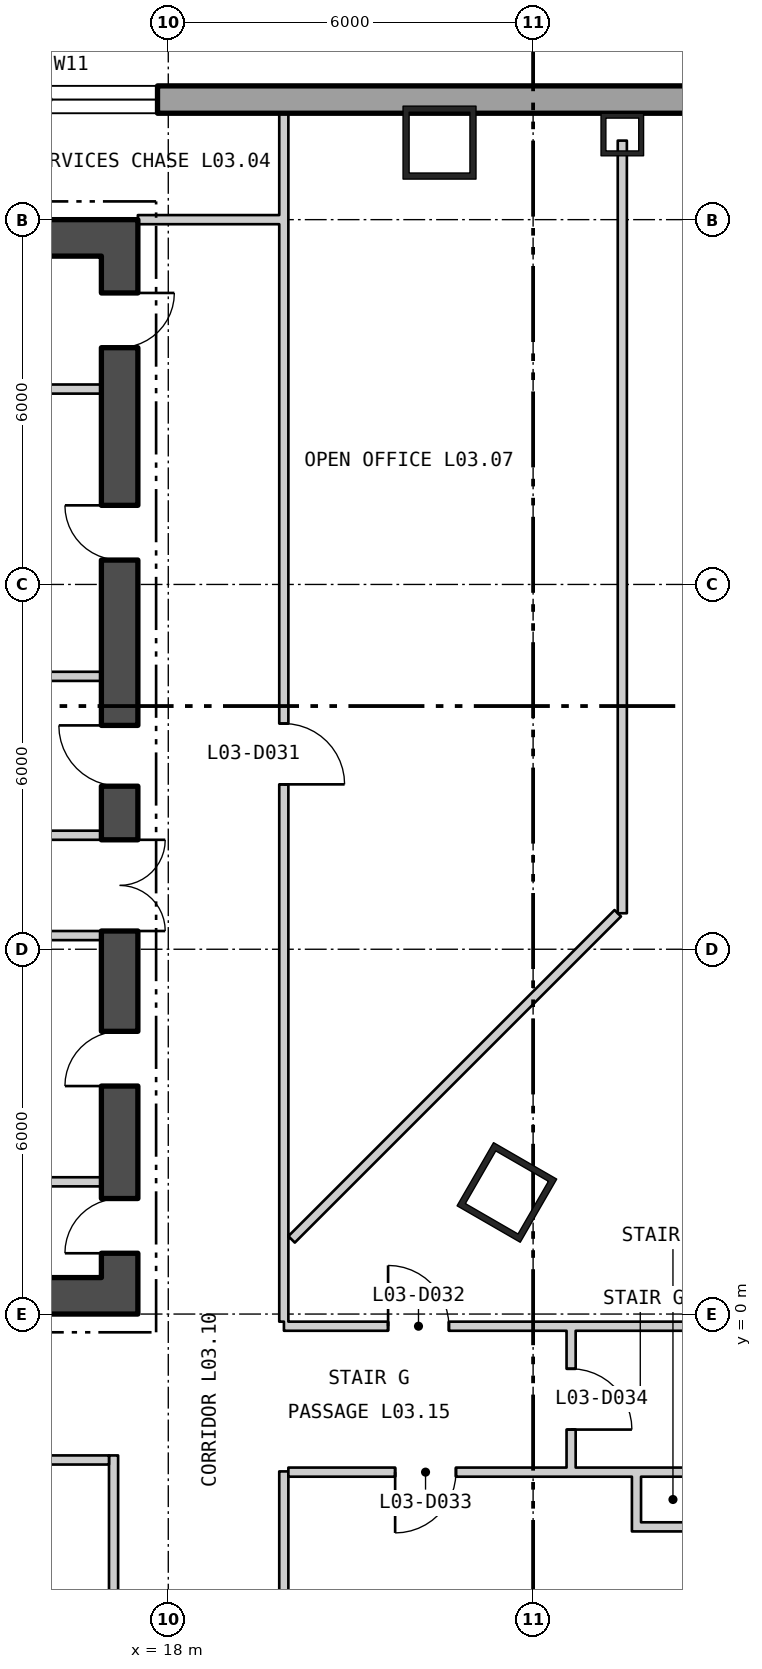
"""IFC4 building model, lengths in metres.
Left out: names, types, materials, properties, quantities, classifications, styles, units other than length and angle.
Written with IfcOpenShell. Run it as: python <this file> out.ifc"""

import sys

from ifc_helpers import new_model, si_unit, direction, frame, frame_2d, origin, origin_2d, place, context, subcontext, project, spatial, polyline, rectangle, hollow_rectangle, outline, extrude, element, fill, save


model = new_model("IFC4")
c1 = context("Model", 3, precision=1e-05, world=origin(), true_north=direction((0.0, 1.0)))
c2 = subcontext(c1, "Body", "Model", "MODEL_VIEW")
j1 = project(units=[si_unit("LENGTHUNIT", "METRE"), si_unit("PLANEANGLEUNIT", "RADIAN")], contexts=[c1])
p1 = place(None, origin())
s1 = spatial("IfcSite", under=j1, at=p1, CompositionType="ELEMENT")
p2 = place(p1, origin())
s2 = spatial("IfcBuilding", under=s1, at=p2, CompositionType="ELEMENT")
p3 = place(p2, frame((0.0, 0.0, 18.6)))
s3 = spatial("IfcBuildingStorey", under=s2, at=p3, CompositionType="ELEMENT", Elevation=18.6)
for number, where, z_axis, x_axis in (
    (1, (22.461, 19.267, 0.0), (0.0, 0.0, 1.0), (-1.0, 0.0, 0.0)),
    (2, (23.569, 2.0, 0.0), (0.0, 0.0, 1.0), (0.5, 0.866, 0.0)),
):
    element("IfcColumn", number, at=place(p3, frame(where, z_axis=z_axis, x_axis=x_axis)), inside=s3, PredefinedType="COLUMN", context=c2, shape_type="SweptSolid", body=[
        extrude(hollow_rectangle(XDim=1.2, YDim=1.2, WallThickness=0.1, at=origin_2d()), origin(), (0.0, 0.0, 1.0), 5.1),
    ])
p4 = place(p3, frame((25.467, 19.4, 0.0), z_axis=(0.0, 0.0, 1.0), x_axis=(-1.0, 0.0, 0.0)))
e3 = element("IfcColumn", 3, at=p4, inside=s3, PredefinedType="COLUMN", context=c2, shape_type="SweptSolid", body=[
    extrude(hollow_rectangle(XDim=0.7, YDim=0.7, WallThickness=0.08, at=origin_2d()), origin(), (0.0, 0.0, 1.0), 5.1),
])
p5 = place(p3, frame((38.775, 19.975, -0.4), z_axis=(0.0, 0.0, 1.0), x_axis=(-1.0, 0.0, 0.0)))
e4 = element("IfcWall", 4, at=p5, inside=s3, PredefinedType="SOLIDWALL", context=c2, shape_type="SweptSolid", body=[
    extrude(outline(polyline([(-0.225, -0.225), (77.775, -0.225), (77.325, 0.225), (0.225, 0.225), (-0.225, -0.225)])), origin(), (0.0, 0.0, 1.0), 5.1),
])
p6 = place(p5, frame((1.958, 0.0, 1.3)))
e5 = element("IfcOpeningElement", 5, at=p6, cuts=e4, PredefinedType="OPENING", context=c2, shape_type="SweptSolid", body=[
    extrude(rectangle(XDim=3.6, YDim=3.2, at=frame_2d((1.8, 1.6))), frame((0.0, 0.235, 0.0), z_axis=(0.0, -1.0, 0.0), x_axis=(1.0, 0.0, 0.0)), (0.0, 0.0, 1.0), 0.47),
])
p7 = place(p5, frame((8.325, 0.0, 1.3)))
e6 = element("IfcOpeningElement", 6, at=p7, cuts=e4, PredefinedType="OPENING", context=c2, shape_type="SweptSolid", body=[
    extrude(rectangle(XDim=3.6, YDim=3.2, at=frame_2d((1.8, 1.6))), frame((0.0, 0.235, 0.0), z_axis=(0.0, -1.0, 0.0), x_axis=(1.0, 0.0, 0.0)), (0.0, 0.0, 1.0), 0.47),
])
p8 = place(p5, frame((20.952, 0.0, 1.3)))
e7 = element("IfcOpeningElement", 7, at=p8, cuts=e4, PredefinedType="OPENING", context=c2, shape_type="SweptSolid", body=[
    extrude(rectangle(XDim=3.6, YDim=3.2, at=frame_2d((1.8, 1.6))), frame((0.0, 0.235, 0.0), z_axis=(0.0, -1.0, 0.0), x_axis=(1.0, 0.0, 0.0)), (0.0, 0.0, 1.0), 0.47),
])
p9 = place(p5, frame((27.425, 0.0, 1.3)))
e8 = element("IfcOpeningElement", 8, at=p9, cuts=e4, PredefinedType="OPENING", context=c2, shape_type="SweptSolid", body=[
    extrude(rectangle(XDim=3.6, YDim=3.2, at=frame_2d((1.8, 1.6))), frame((0.0, 0.235, 0.0), z_axis=(0.0, -1.0, 0.0), x_axis=(1.0, 0.0, 0.0)), (0.0, 0.0, 1.0), 0.47),
])
p10 = place(p5, frame((46.525, 0.0, 1.3)))
e9 = element("IfcOpeningElement", 9, at=p10, cuts=e4, PredefinedType="OPENING", context=c2, shape_type="SweptSolid", body=[
    extrude(rectangle(XDim=3.6, YDim=3.2, at=frame_2d((1.8, 1.6))), frame((0.0, 0.235, 0.0), z_axis=(0.0, -1.0, 0.0), x_axis=(1.0, 0.0, 0.0)), (0.0, 0.0, 1.0), 0.47),
])
p11 = place(p5, frame((52.998, 0.0, 1.3)))
e10 = element("IfcOpeningElement", 10, at=p11, cuts=e4, PredefinedType="OPENING", context=c2, shape_type="SweptSolid", body=[
    extrude(rectangle(XDim=3.6, YDim=3.2, at=frame_2d((1.8, 1.6))), frame((0.0, 0.235, 0.0), z_axis=(0.0, -1.0, 0.0), x_axis=(1.0, 0.0, 0.0)), (0.0, 0.0, 1.0), 0.47),
])
p12 = place(p5, frame((65.625, 0.0, 1.3)))
e11 = element("IfcOpeningElement", 11, at=p12, cuts=e4, PredefinedType="OPENING", context=c2, shape_type="SweptSolid", body=[
    extrude(rectangle(XDim=3.6, YDim=3.2, at=frame_2d((1.8, 1.6))), frame((0.0, 0.235, 0.0), z_axis=(0.0, -1.0, 0.0), x_axis=(1.0, 0.0, 0.0)), (0.0, 0.0, 1.0), 0.47),
])
p13 = place(p5, frame((71.992, 0.0, 1.3)))
e12 = element("IfcOpeningElement", 12, at=p13, cuts=e4, PredefinedType="OPENING", context=c2, shape_type="SweptSolid", body=[
    extrude(rectangle(XDim=3.6, YDim=3.2, at=frame_2d((1.8, 1.6))), frame((0.0, 0.235, 0.0), z_axis=(0.0, -1.0, 0.0), x_axis=(1.0, 0.0, 0.0)), (0.0, 0.0, 1.0), 0.47),
])
p14 = place(p3, frame((-17.5, 0.3, 0.0), z_axis=(0.0, 0.0, 1.0), x_axis=(1.0, 0.0, 0.0)))
e13 = element("IfcWall", 13, at=p14, inside=s3, PredefinedType="SHEAR", context=c2, shape_type="SweptSolid", body=[
    extrude(rectangle(XDim=35.0, YDim=0.6, at=frame_2d((17.5, 0.0))), origin(), (0.0, 0.0, 1.0), 4.88),
])
p15 = place(p14, frame((12.0, 0.0, 0.0)))
e14 = element("IfcOpeningElement", 14, at=p15, cuts=e13, PredefinedType="OPENING", context=c2, shape_type="SweptSolid", body=[
    extrude(rectangle(XDim=1.8, YDim=2.4, at=frame_2d((0.9, 1.2))), frame((0.0, 0.31, 0.0), z_axis=(0.0, -1.0, 0.0), x_axis=(1.0, 0.0, 0.0)), (0.0, 0.0, 1.0), 0.62),
])
p16 = place(p14, frame((22.0, 0.0, 0.0)))
e15 = element("IfcOpeningElement", 15, at=p16, cuts=e13, PredefinedType="OPENING", context=c2, shape_type="SweptSolid", body=[
    extrude(rectangle(XDim=1.8, YDim=2.4, at=frame_2d((0.9, 1.2))), frame((0.0, 0.31, 0.0), z_axis=(0.0, -1.0, 0.0), x_axis=(1.0, 0.0, 0.0)), (0.0, 0.0, 1.0), 0.62),
])
p17 = place(p3, frame((-17.5, 17.7, 0.0), z_axis=(0.0, 0.0, 1.0), x_axis=(1.0, 0.0, 0.0)))
e16 = element("IfcWall", 16, at=p17, inside=s3, PredefinedType="SHEAR", context=c2, shape_type="SweptSolid", body=[
    extrude(rectangle(XDim=35.0, YDim=0.6, at=frame_2d((17.5, 0.0))), origin(), (0.0, 0.0, 1.0), 4.88),
])
p18 = place(p3, frame((17.2, 0.6, 0.0), z_axis=(0.0, 0.0, 1.0), x_axis=(0.0, 1.0, 0.0)))
e17 = element("IfcWall", 17, at=p18, inside=s3, PredefinedType="SHEAR", context=c2, shape_type="SweptSolid", body=[
    extrude(rectangle(XDim=16.8, YDim=0.6, at=frame_2d((8.4, 0.0))), origin(), (0.0, 0.0, 1.0), 4.88),
])
p19 = place(p18, frame((5.7, 0.0, 0.0)))
e18 = element("IfcOpeningElement", 18, at=p19, cuts=e17, PredefinedType="OPENING", context=c2, shape_type="SweptSolid", body=[
    extrude(rectangle(XDim=1.5, YDim=2.1, at=frame_2d((0.75, 1.05))), frame((0.0, 0.31, 0.0), z_axis=(0.0, -1.0, 0.0), x_axis=(1.0, 0.0, 0.0)), (0.0, 0.0, 1.0), 0.62),
])
p20 = place(p18, frame((0.4, 0.0, 0.0)))
e19 = element("IfcOpeningElement", 19, at=p20, cuts=e17, PredefinedType="OPENING", context=c2, shape_type="SweptSolid", body=[
    extrude(rectangle(XDim=0.9, YDim=2.1, at=frame_2d((0.45, 1.05))), frame((0.0, 0.31, 0.0), z_axis=(0.0, -1.0, 0.0), x_axis=(1.0, 0.0, 0.0)), (0.0, 0.0, 1.0), 0.62),
])
p21 = place(p18, frame((3.15, 0.0, 0.0)))
e20 = element("IfcOpeningElement", 20, at=p21, cuts=e17, PredefinedType="OPENING", context=c2, shape_type="SweptSolid", body=[
    extrude(rectangle(XDim=0.9, YDim=2.1, at=frame_2d((0.45, 1.05))), frame((0.0, 0.31, 0.0), z_axis=(0.0, -1.0, 0.0), x_axis=(1.0, 0.0, 0.0)), (0.0, 0.0, 1.0), 0.62),
])
p22 = place(p18, frame((8.082, 0.0, 0.0)))
e21 = element("IfcOpeningElement", 21, at=p22, cuts=e17, PredefinedType="OPENING", context=c2, shape_type="SweptSolid", body=[
    extrude(rectangle(XDim=1.0, YDim=2.1, at=frame_2d((0.5, 1.05))), frame((0.0, 0.31, 0.0), z_axis=(0.0, -1.0, 0.0), x_axis=(1.0, 0.0, 0.0)), (0.0, 0.0, 1.0), 0.62),
])
p23 = place(p18, frame((11.801, 0.0, 0.0)))
e22 = element("IfcOpeningElement", 22, at=p23, cuts=e17, PredefinedType="OPENING", context=c2, shape_type="SweptSolid", body=[
    extrude(rectangle(XDim=0.9, YDim=2.1, at=frame_2d((0.45, 1.05))), frame((0.0, 0.31, 0.0), z_axis=(0.0, -1.0, 0.0), x_axis=(1.0, 0.0, 0.0)), (0.0, 0.0, 1.0), 0.62),
])
p24 = place(p18, frame((15.294, 0.0, 0.0)))
e23 = element("IfcOpeningElement", 23, at=p24, cuts=e17, PredefinedType="OPENING", context=c2, shape_type="SweptSolid", body=[
    extrude(rectangle(XDim=0.9, YDim=2.1, at=frame_2d((0.45, 1.05))), frame((0.0, 0.31, 0.0), z_axis=(0.0, -1.0, 0.0), x_axis=(1.0, 0.0, 0.0)), (0.0, 0.0, 1.0), 0.62),
])
for number, where, z_axis, x_axis in (
    (24, (14.5, 6.225, 0.0), (0.0, 0.0, 1.0), (1.0, 0.0, 0.0)),
    (25, (14.5, 7.875, 0.0), (0.0, 0.0, 1.0), (1.0, 0.0, 0.0)),
    (26, (14.5, 2.175, 0.0), (0.0, 0.0, 1.0), (1.0, 0.0, 0.0)),
    (27, (14.5, 10.489, 0.0), (0.0, 0.0, 1.0), (1.0, 0.0, 0.0)),
    (28, (14.5, 15.213, 0.0), (0.0, 0.0, 1.0), (1.0, 0.0, 0.0)),
):
    element("IfcWall", number, at=place(p3, frame(where, z_axis=z_axis, x_axis=x_axis)), inside=s3, PredefinedType="PARTITIONING", context=c2, shape_type="SweptSolid", body=[
        extrude(rectangle(XDim=2.4, YDim=0.15, at=frame_2d((1.2, 0.0))), origin(), (0.0, 0.0, 1.0), 4.88),
    ])
p25 = place(p3, frame((9.075, -2.4, 0.0), z_axis=(0.0, 0.0, 1.0), x_axis=(1.0, 0.0, 0.0)))
e29 = element("IfcWall", 29, at=p25, inside=s3, PredefinedType="PARTITIONING", context=c2, shape_type="SweptSolid", body=[
    extrude(rectangle(XDim=7.95, YDim=0.15, at=frame_2d((3.975, 0.0))), origin(), (0.0, 0.0, 1.0), 4.88),
])
p26 = place(p25, frame((1.304, 0.0, 0.0)))
e30 = element("IfcOpeningElement", 30, at=p26, cuts=e29, PredefinedType="OPENING", context=c2, shape_type="SweptSolid", body=[
    extrude(rectangle(XDim=1.0, YDim=2.1, at=frame_2d((0.5, 1.05))), frame((0.0, 0.085, 0.0), z_axis=(0.0, -1.0, 0.0), x_axis=(1.0, 0.0, 0.0)), (0.0, 0.0, 1.0), 0.17),
])
p27 = place(p25, frame((5.304, 0.0, 0.0)))
e31 = element("IfcOpeningElement", 31, at=p27, cuts=e29, PredefinedType="OPENING", context=c2, shape_type="SweptSolid", body=[
    extrude(rectangle(XDim=1.0, YDim=2.1, at=frame_2d((0.5, 1.05))), frame((0.0, 0.085, 0.0), z_axis=(0.0, -1.0, 0.0), x_axis=(1.0, 0.0, 0.0)), (0.0, 0.0, 1.0), 0.17),
])
p28 = place(p3, frame((17.1, -21.375, 0.0), z_axis=(0.0, 0.0, 1.0), x_axis=(0.0, 1.0, 0.0)))
e32 = element("IfcWall", 32, at=p28, inside=s3, PredefinedType="PARTITIONING", context=c2, shape_type="SweptSolid", body=[
    extrude(rectangle(XDim=19.05, YDim=0.15, at=frame_2d((9.525, 0.0))), origin(), (0.0, 0.0, 1.0), 4.88),
])
p29 = place(p3, frame((17.5, 18.0, 0.0), z_axis=(0.0, 0.0, 1.0), x_axis=(1.0, 0.0, 0.0)))
e33 = element("IfcWall", 33, at=p29, inside=s3, PredefinedType="PARTITIONING", context=c2, shape_type="SweptSolid", body=[
    extrude(rectangle(XDim=2.475, YDim=0.15, at=frame_2d((1.238, 0.0))), origin(), (0.0, 0.0, 1.0), 4.33),
])
p30 = place(p3, frame((19.9, -23.775, 0.0), z_axis=(0.0, 0.0, 1.0), x_axis=(0.0, 1.0, 0.0)))
e34 = element("IfcWall", 34, at=p30, inside=s3, PredefinedType="PARTITIONING", context=c2, shape_type="SweptSolid", body=[
    extrude(rectangle(XDim=21.187, YDim=0.15, at=frame_2d((10.594, 0.0))), origin(), (0.0, 0.0, 1.0), 4.88),
])
p31 = place(p30, frame((3.017, 0.0, 0.0)))
e35 = element("IfcOpeningElement", 35, at=p31, cuts=e34, PredefinedType="OPENING", context=c2, shape_type="SweptSolid", body=[
    extrude(rectangle(XDim=1.0, YDim=2.1, at=frame_2d((0.5, 1.05))), frame((0.0, 0.085, 0.0), z_axis=(0.0, -1.0, 0.0), x_axis=(1.0, 0.0, 0.0)), (0.0, 0.0, 1.0), 0.17),
])
p32 = place(p30, frame((12.423, 0.0, 0.0)))
e36 = element("IfcOpeningElement", 36, at=p32, cuts=e34, PredefinedType="OPENING", context=c2, shape_type="SweptSolid", body=[
    extrude(rectangle(XDim=1.0, YDim=2.1, at=frame_2d((0.5, 1.05))), frame((0.0, 0.085, 0.0), z_axis=(0.0, -1.0, 0.0), x_axis=(1.0, 0.0, 0.0)), (0.0, 0.0, 1.0), 0.17),
])
p33 = place(p3, frame((19.9, -0.125, 0.0), z_axis=(0.0, 0.0, 1.0), x_axis=(0.0, 1.0, 0.0)))
e37 = element("IfcWall", 37, at=p33, inside=s3, PredefinedType="PARTITIONING", context=c2, shape_type="SweptSolid", body=[
    extrude(rectangle(XDim=1.15, YDim=0.15, at=frame_2d((0.575, 0.0))), origin(), (0.0, 0.0, 1.0), 4.88),
])
p34 = place(p3, frame((19.9, 1.025, 0.0), z_axis=(0.0, 0.0, 1.0), x_axis=(0.0, 1.0, 0.0)))
e38 = element("IfcWall", 38, at=p34, inside=s3, PredefinedType="PARTITIONING", context=c2, shape_type="SweptSolid", body=[
    extrude(rectangle(XDim=16.9, YDim=0.15, at=frame_2d((8.45, 0.0))), origin(), (0.0, 0.0, 1.0), 4.88),
])
p35 = place(p34, frame((7.687, 0.0, 0.0)))
e39 = element("IfcOpeningElement", 39, at=p35, cuts=e38, PredefinedType="OPENING", context=c2, shape_type="SweptSolid", body=[
    extrude(rectangle(XDim=1.0, YDim=2.1, at=frame_2d((0.5, 1.05))), frame((0.0, 0.085, 0.0), z_axis=(0.0, -1.0, 0.0), x_axis=(1.0, 0.0, 0.0)), (0.0, 0.0, 1.0), 0.17),
])
p36 = place(p3, frame((19.9, 18.075, 0.0), z_axis=(0.0, 0.0, 1.0), x_axis=(0.0, 1.0, 0.0)))
e40 = element("IfcWall", 40, at=p36, inside=s3, PredefinedType="PARTITIONING", context=c2, shape_type="SweptSolid", body=[
    extrude(rectangle(XDim=1.675, YDim=0.15, at=frame_2d((0.838, 0.0))), origin(), (0.0, 0.0, 1.0), 4.88),
])
p37 = place(p3, frame((19.902, -0.2, 0.0), z_axis=(0.0, 0.0, 1.0), x_axis=(1.0, 0.0, 0.0)))
e41 = element("IfcWall", 41, at=p37, inside=s3, PredefinedType="PARTITIONING", context=c2, shape_type="SweptSolid", body=[
    extrude(rectangle(XDim=6.848, YDim=0.15, at=frame_2d((3.424, 0.0))), origin(), (0.0, 0.0, 1.0), 4.88),
])
p38 = place(p37, frame((1.713, 0.0, 0.0)))
e42 = element("IfcOpeningElement", 42, at=p38, cuts=e41, PredefinedType="OPENING", context=c2, shape_type="SweptSolid", body=[
    extrude(rectangle(XDim=1.0, YDim=2.1, at=frame_2d((0.5, 1.05))), frame((0.0, 0.085, 0.0), z_axis=(0.0, -1.0, 0.0), x_axis=(1.0, 0.0, 0.0)), (0.0, 0.0, 1.0), 0.17),
])
p39 = place(p3, frame((19.975, -2.6, 0.0), z_axis=(0.0, 0.0, 1.0), x_axis=(1.0, 0.0, 0.0)))
e43 = element("IfcWall", 43, at=p39, inside=s3, PredefinedType="PARTITIONING", context=c2, shape_type="SweptSolid", body=[
    extrude(rectangle(XDim=5.713, YDim=0.15, at=frame_2d((2.857, 0.0))), origin(), (0.0, 0.0, 1.0), 4.88),
])
p40 = place(p39, frame((1.756, 0.0, 0.0)))
e44 = element("IfcOpeningElement", 44, at=p40, cuts=e43, PredefinedType="OPENING", context=c2, shape_type="SweptSolid", body=[
    extrude(rectangle(XDim=1.0, YDim=2.1, at=frame_2d((0.5, 1.05))), frame((0.0, 0.085, 0.0), z_axis=(0.0, -1.0, 0.0), x_axis=(1.0, 0.0, 0.0)), (0.0, 0.0, 1.0), 0.17),
])
p41 = place(p3, frame((20.028, 1.228, 0.0), z_axis=(0.0, 0.0, 1.0), x_axis=(0.707106781187, 0.707106781187, 0.0)))
e45 = element("IfcWall", 45, at=p41, inside=s3, PredefinedType="PARTITIONING", context=c2, shape_type="SweptSolid", body=[
    extrude(rectangle(XDim=7.586, YDim=0.15, at=frame_2d((3.793, 0.0))), origin(), (0.0, 0.0, 1.0), 4.88),
])
p42 = place(p3, frame((24.625, -2.525, 0.0), z_axis=(0.0, 0.0, 1.0), x_axis=(0.0, 1.0, 0.0)))
e46 = element("IfcWall", 46, at=p42, inside=s3, PredefinedType="PARTITIONING", context=c2, shape_type="SweptSolid", body=[
    extrude(rectangle(XDim=2.25, YDim=0.15, at=frame_2d((1.125, 0.0))), origin(), (0.0, 0.0, 1.0), 4.88),
])
p43 = place(p42, frame((0.625, 0.0, 0.0)))
e47 = element("IfcOpeningElement", 47, at=p43, cuts=e46, PredefinedType="OPENING", context=c2, shape_type="SweptSolid", body=[
    extrude(rectangle(XDim=1.0, YDim=2.1, at=frame_2d((0.5, 1.05))), frame((0.0, 0.085, 0.0), z_axis=(0.0, -1.0, 0.0), x_axis=(1.0, 0.0, 0.0)), (0.0, 0.0, 1.0), 0.17),
])
p44 = place(p3, frame((25.467, 6.592, 0.0), z_axis=(0.0, 0.0, 1.0), x_axis=(0.0, 1.0, 0.0)))
e48 = element("IfcWall", 48, at=p44, inside=s3, PredefinedType="PARTITIONING", context=c2, shape_type="SweptSolid", body=[
    extrude(rectangle(XDim=7.736, YDim=0.15, at=frame_2d((3.868, 0.0))), origin(), (0.0, 0.0, 1.0), 4.88),
])
p45 = place(p3, frame((25.467, 14.328, 0.0), z_axis=(0.0, 0.0, 1.0), x_axis=(0.0, 1.0, 0.0)))
e49 = element("IfcWall", 49, at=p45, inside=s3, PredefinedType="PARTITIONING", context=c2, shape_type="SweptSolid", body=[
    extrude(rectangle(XDim=4.972, YDim=0.15, at=frame_2d((2.486, 0.0))), origin(), (0.0, 0.0, 1.0), 4.28),
])
p46 = place(p3, frame((25.625, -3.5, 0.0), z_axis=(0.0, 0.0, 1.0), x_axis=(1.0, 0.0, 0.0)))
e50 = element("IfcWall", 50, at=p46, inside=s3, PredefinedType="PARTITIONING", context=c2, shape_type="SweptSolid", body=[
    extrude(rectangle(XDim=1.125, YDim=0.15, at=frame_2d((0.562, 0.0))), origin(), (0.0, 0.0, 1.0), 4.88),
])
p47 = place(p3, frame((25.688, -2.6, 0.0), z_axis=(0.0, 0.0, 1.0), x_axis=(1.0, 0.0, 0.0)))
e51 = element("IfcWall", 51, at=p47, inside=s3, PredefinedType="PARTITIONING", context=c2, shape_type="SweptSolid", body=[
    extrude(rectangle(XDim=1.062, YDim=0.15, at=frame_2d((0.531, 0.0))), origin(), (0.0, 0.0, 1.0), 4.88),
])
p48 = place(p3, frame((25.7, -3.425, 0.0), z_axis=(0.0, 0.0, 1.0), x_axis=(0.0, 1.0, 0.0)))
e52 = element("IfcWall", 52, at=p48, inside=s3, PredefinedType="PARTITIONING", context=c2, shape_type="SweptSolid", body=[
    extrude(rectangle(XDim=0.75, YDim=0.15, at=frame_2d((0.375, 0.0))), origin(), (0.0, 0.0, 1.0), 4.88),
])
p49 = place(p8, origin())
e53 = element("IfcWindow", 53, at=p49, inside=s3, PartitioningType="SINGLE_PANEL", PredefinedType="WINDOW", context=c2, shape_type="SweptSolid", body=[
    extrude(rectangle(XDim=3.6, YDim=3.2, at=frame_2d((1.8, 1.6))), frame((0.0, 0.105, 0.0), z_axis=(0.0, -1.0, 0.0), x_axis=(1.0, 0.0, 0.0)), (0.0, 0.0, 1.0), 0.06),
])
fill(e7, e53)
p50 = place(p19, origin())
e54 = element("IfcDoor", 54, at=p50, inside=s3, OperationType="DOUBLE_DOOR_SINGLE_SWING", PredefinedType="DOOR", context=c2, shape_type="SweptSolid", body=[
    extrude(rectangle(XDim=1.5, YDim=2.1, at=frame_2d((0.75, 1.05))), frame((0.0, 0.025, 0.0), z_axis=(0.0, -1.0, 0.0), x_axis=(1.0, 0.0, 0.0)), (0.0, 0.0, 1.0), 0.05),
])
fill(e18, e54)
p51 = place(p20, origin())
e55 = element("IfcDoor", 55, at=p51, inside=s3, OperationType="SINGLE_SWING_RIGHT", PredefinedType="DOOR", context=c2, shape_type="SweptSolid", body=[
    extrude(rectangle(XDim=0.9, YDim=2.1, at=frame_2d((0.45, 1.05))), frame((0.0, 0.025, 0.0), z_axis=(0.0, -1.0, 0.0), x_axis=(1.0, 0.0, 0.0)), (0.0, 0.0, 1.0), 0.05),
])
fill(e19, e55)
p52 = place(p21, origin())
e56 = element("IfcDoor", 56, at=p52, inside=s3, OperationType="SINGLE_SWING_RIGHT", PredefinedType="DOOR", context=c2, shape_type="SweptSolid", body=[
    extrude(rectangle(XDim=0.9, YDim=2.1, at=frame_2d((0.45, 1.05))), frame((0.0, 0.025, 0.0), z_axis=(0.0, -1.0, 0.0), x_axis=(1.0, 0.0, 0.0)), (0.0, 0.0, 1.0), 0.05),
])
fill(e20, e56)
p53 = place(p22, origin())
e57 = element("IfcDoor", 57, at=p53, inside=s3, OperationType="SINGLE_SWING_LEFT", PredefinedType="DOOR", context=c2, shape_type="SweptSolid", body=[
    extrude(rectangle(XDim=1.0, YDim=2.1, at=frame_2d((0.5, 1.05))), frame((0.0, 0.025, 0.0), z_axis=(0.0, -1.0, 0.0), x_axis=(1.0, 0.0, 0.0)), (0.0, 0.0, 1.0), 0.05),
])
fill(e21, e57)
p54 = place(p23, origin())
e58 = element("IfcDoor", 58, at=p54, inside=s3, OperationType="SINGLE_SWING_LEFT", PredefinedType="DOOR", context=c2, shape_type="SweptSolid", body=[
    extrude(rectangle(XDim=0.9, YDim=2.1, at=frame_2d((0.45, 1.05))), frame((0.0, 0.025, 0.0), z_axis=(0.0, -1.0, 0.0), x_axis=(1.0, 0.0, 0.0)), (0.0, 0.0, 1.0), 0.05),
])
fill(e22, e58)
p55 = place(p24, origin())
e59 = element("IfcDoor", 59, at=p55, inside=s3, OperationType="SINGLE_SWING_RIGHT", PredefinedType="DOOR", context=c2, shape_type="SweptSolid", body=[
    extrude(rectangle(XDim=0.9, YDim=2.1, at=frame_2d((0.45, 1.05))), frame((0.0, 0.025, 0.0), z_axis=(0.0, -1.0, 0.0), x_axis=(1.0, 0.0, 0.0)), (0.0, 0.0, 1.0), 0.05),
])
fill(e23, e59)
p56 = place(p35, origin())
e60 = element("IfcDoor", 60, at=p56, inside=s3, OperationType="SINGLE_SWING_LEFT", PredefinedType="DOOR", context=c2, shape_type="SweptSolid", body=[
    extrude(rectangle(XDim=1.0, YDim=2.1, at=frame_2d((0.5, 1.05))), frame((0.0, 0.025, 0.0), z_axis=(0.0, -1.0, 0.0), x_axis=(1.0, 0.0, 0.0)), (0.0, 0.0, 1.0), 0.05),
])
fill(e39, e60)
p57 = place(p38, origin())
e61 = element("IfcDoor", 61, at=p57, inside=s3, OperationType="SINGLE_SWING_RIGHT", PredefinedType="DOOR", context=c2, shape_type="SweptSolid", body=[
    extrude(rectangle(XDim=1.0, YDim=2.1, at=frame_2d((0.5, 1.05))), frame((0.0, 0.025, 0.0), z_axis=(0.0, -1.0, 0.0), x_axis=(1.0, 0.0, 0.0)), (0.0, 0.0, 1.0), 0.05),
])
fill(e42, e61)
p58 = place(p40, origin())
e62 = element("IfcDoor", 62, at=p58, inside=s3, OperationType="SINGLE_SWING_LEFT", PredefinedType="DOOR", context=c2, shape_type="SweptSolid", body=[
    extrude(rectangle(XDim=1.0, YDim=2.1, at=frame_2d((0.5, 1.05))), frame((0.0, 0.025, 0.0), z_axis=(0.0, -1.0, 0.0), x_axis=(1.0, 0.0, 0.0)), (0.0, 0.0, 1.0), 0.05),
])
fill(e44, e62)
p59 = place(p43, origin())
e63 = element("IfcDoor", 63, at=p59, inside=s3, OperationType="SINGLE_SWING_LEFT", PredefinedType="DOOR", context=c2, shape_type="SweptSolid", body=[
    extrude(rectangle(XDim=1.0, YDim=2.1, at=frame_2d((0.5, 1.05))), frame((0.0, 0.025, 0.0), z_axis=(0.0, -1.0, 0.0), x_axis=(1.0, 0.0, 0.0)), (0.0, 0.0, 1.0), 0.05),
])
fill(e47, e63)
save(model, sys.argv[1])
